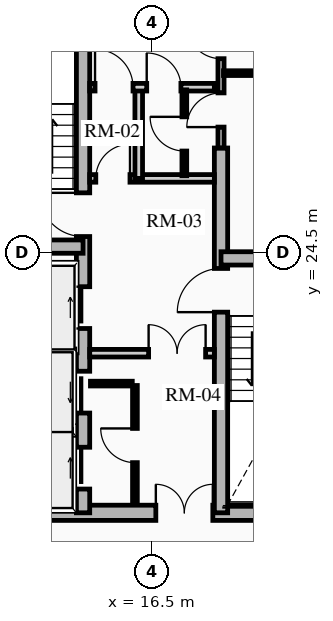
"""IFC4 building model, lengths in metres.
Left out: names, types, materials, properties, quantities, classifications, styles, units other than length and angle.
Written with IfcOpenShell. Run it as: python <this file> out.ifc"""

import sys

from ifc_helpers import new_model, si_unit, direction, frame, frame_2d, origin, place, context, subcontext, project, spatial, rectangle, extrude, source, transform, mapped, element, fill, save


model = new_model("IFC4")
c1 = context("Model", 3, precision=1e-05, world=origin(), true_north=direction((0.0, 1.0)))
c2 = subcontext(c1, "Body", "Model", "MODEL_VIEW")
j1 = project(units=[si_unit("LENGTHUNIT", "METRE"), si_unit("PLANEANGLEUNIT", "RADIAN")], contexts=[c1])
p1 = place(None, origin())
s1 = spatial("IfcSite", under=j1, at=p1, CompositionType="ELEMENT")
p2 = place(p1, origin())
s2 = spatial("IfcBuilding", under=s1, at=p2, CompositionType="ELEMENT")
p3 = place(p2, frame((0.0, 0.0, 205.39)))
s3 = spatial("IfcBuildingStorey", under=s2, at=p3, CompositionType="ELEMENT", Elevation=205.39)
p4 = place(p3, frame((11.15, 17.65, 0.0), z_axis=(0.0, 0.0, 1.0), x_axis=(1.0, 0.0, 0.0)))
e1 = element("IfcWall", 1, at=p4, inside=s3, PredefinedType="SHEAR", context=c2, shape_type="SweptSolid", body=[
    extrude(rectangle(XDim=10.7, YDim=0.4, at=frame_2d((5.35, 0.0))), origin(), (0.0, 0.0, 1.0), 2.91),
])
m1 = source(origin(), c2, "Body", "SweptSolid", [
    extrude(rectangle(XDim=1.5, YDim=2.02, at=frame_2d((0.75, 1.01))), frame((0.0, 0.21, 0.0), z_axis=(0.0, -1.0, 0.0), x_axis=(1.0, 0.0, 0.0)), (0.0, 0.0, 1.0), 0.42),
])
p5 = place(p4, frame((5.45, 0.0, 0.0)))
e2 = element("IfcOpeningElement", 2, at=p5, cuts=e1, PredefinedType="OPENING", context=c2, shape_type="MappedRepresentation", body=[
    mapped(m1, transform((0.0, 0.0, 0.0), x_axis=(1.0, 0.0, 0.0), y_axis=(0.0, 1.0, 0.0), z_axis=(0.0, 0.0, 1.0), scale=1.0)),
])
p6 = place(p3, frame((14.685, 17.65, 0.0), z_axis=(0.0, 0.0, 1.0), x_axis=(0.0, 1.0, 0.0)))
e3 = element("IfcWall", 3, at=p6, inside=s3, PredefinedType="SHEAR", context=c2, shape_type="SweptSolid", body=[
    extrude(rectangle(XDim=13.7, YDim=0.35, at=frame_2d((6.85, 0.0))), origin(), (0.0, 0.0, 1.0), 2.91),
])
m2 = source(origin(), c2, "Body", "SweptSolid", [
    extrude(rectangle(XDim=1.1, YDim=2.015, at=frame_2d((0.55, 1.007))), frame((0.0, 0.185, 0.0), z_axis=(0.0, -1.0, 0.0), x_axis=(1.0, 0.0, 0.0)), (0.0, 0.0, 1.0), 0.37),
])
p7 = place(p6, frame((4.85, 0.0, 0.0)))
e4 = element("IfcOpeningElement", 4, at=p7, cuts=e3, PredefinedType="OPENING", context=c2, shape_type="MappedRepresentation", body=[
    mapped(m2, transform((0.0, 0.0, 0.0), x_axis=(1.0, 0.0, 0.0), y_axis=(0.0, 1.0, 0.0), z_axis=(0.0, 0.0, 1.0), scale=1.0)),
])
p8 = place(p6, frame((0.625, 0.0, 0.0)))
e5 = element("IfcOpeningElement", 5, at=p8, cuts=e3, PredefinedType="OPENING", context=c2, shape_type="MappedRepresentation", body=[
    mapped(m2, transform((0.0, 0.0, 0.0), x_axis=(1.0, 0.0, 0.0), y_axis=(0.0, 1.0, 0.0), z_axis=(0.0, 0.0, 1.0), scale=1.0)),
])
p9 = place(p6, frame((2.625, 0.0, 0.0)))
e6 = element("IfcOpeningElement", 6, at=p9, cuts=e3, PredefinedType="OPENING", context=c2, shape_type="MappedRepresentation", body=[
    mapped(m2, transform((0.0, 0.0, 0.0), x_axis=(1.0, 0.0, 0.0), y_axis=(0.0, 1.0, 0.0), z_axis=(0.0, 0.0, 1.0), scale=1.0)),
])
m3 = source(origin(), c2, "Body", "SweptSolid", [
    extrude(rectangle(XDim=1.15, YDim=2.02, at=frame_2d((0.575, 1.01))), frame((0.0, 0.185, 0.0), z_axis=(0.0, -1.0, 0.0), x_axis=(1.0, 0.0, 0.0)), (0.0, 0.0, 1.0), 0.37),
])
p10 = place(p6, frame((7.27, 0.0, 0.0)))
e7 = element("IfcOpeningElement", 7, at=p10, cuts=e3, PredefinedType="OPENING", context=c2, shape_type="MappedRepresentation", body=[
    mapped(m3, transform((0.0, 0.0, 0.0), x_axis=(1.0, 0.0, 0.0), y_axis=(0.0, 1.0, 0.0), z_axis=(0.0, 0.0, 1.0), scale=1.0)),
])
p11 = place(p3, frame((18.315, 17.65, 0.0), z_axis=(0.0, 0.0, 1.0), x_axis=(0.0, 1.0, 0.0)))
e8 = element("IfcWall", 8, at=p11, inside=s3, PredefinedType="SHEAR", context=c2, shape_type="SweptSolid", body=[
    extrude(rectangle(XDim=9.6, YDim=0.35, at=frame_2d((4.8, 0.0))), origin(), (0.0, 0.0, 1.0), 2.91),
])
p12 = place(p11, frame((5.28, 0.0, 0.0)))
e9 = element("IfcOpeningElement", 9, at=p12, cuts=e8, PredefinedType="OPENING", context=c2, shape_type="MappedRepresentation", body=[
    mapped(m3, transform((0.0, 0.0, 0.0), x_axis=(1.0, 0.0, 0.0), y_axis=(0.0, 1.0, 0.0), z_axis=(0.0, 0.0, 1.0), scale=1.0)),
])
for number, where, z_axis, x_axis in (
    (10, (11.4, 24.655, 0.0), (0.0, 0.0, 1.0), (1.0, 0.0, 0.0)),
    (11, (18.315, 24.345, 0.0), (0.0, 0.0, 1.0), (1.0, 0.0, 0.0)),
):
    element("IfcWall", number, at=place(p3, frame(where, z_axis=z_axis, x_axis=x_axis)), inside=s3, PredefinedType="SHEAR", context=c2, shape_type="SweptSolid", body=[
        extrude(rectangle(XDim=3.285, YDim=0.35, at=frame_2d((1.643, 0.0))), origin(), (0.0, 0.0, 1.0), 2.91),
    ])
for number, where, z_axis, x_axis in (
    (12, (11.52, 21.8, 0.0), (0.0, 0.0, 1.0), (1.0, 0.0, 0.0)),
    (13, (11.52, 19.825, 0.0), (0.0, 0.0, 1.0), (1.0, 0.0, 0.0)),
):
    element("IfcWall", number, at=place(p3, frame(where, z_axis=z_axis, x_axis=x_axis)), inside=s3, PredefinedType="SHEAR", context=c2, shape_type="SweptSolid", body=[
        extrude(rectangle(XDim=2.97, YDim=0.2, at=frame_2d((1.485, 0.0))), origin(), (0.0, 0.0, 1.0), 2.91),
    ])
p13 = place(p3, frame((14.86, 21.85, 0.0), z_axis=(0.0, 0.0, 1.0), x_axis=(1.0, 0.0, 0.0)))
e14 = element("IfcWall", 14, at=p13, inside=s3, PredefinedType="PARTITIONING", context=c2, shape_type="SweptSolid", body=[
    extrude(rectangle(XDim=3.28, YDim=0.2, at=frame_2d((1.64, 0.0))), origin(), (0.0, 0.0, 1.0), 2.685),
])
m4 = source(origin(), c2, "Body", "SweptSolid", [
    extrude(rectangle(XDim=1.5, YDim=2.02, at=frame_2d((0.75, 1.01))), frame((0.0, 0.11, 0.0), z_axis=(0.0, -1.0, 0.0), x_axis=(1.0, 0.0, 0.0)), (0.0, 0.0, 1.0), 0.22),
])
p14 = place(p13, frame((1.55, 0.0, 0.0)))
e15 = element("IfcOpeningElement", 15, at=p14, cuts=e14, PredefinedType="OPENING", context=c2, shape_type="MappedRepresentation", body=[
    mapped(m4, transform((0.0, 0.0, 0.0), x_axis=(1.0, 0.0, 0.0), y_axis=(0.0, 1.0, 0.0), z_axis=(0.0, 0.0, 1.0), scale=1.0)),
])
p15 = place(p3, frame((14.86, 26.45, 0.0), z_axis=(0.0, 0.0, 1.0), x_axis=(1.0, 0.0, 0.0)))
e16 = element("IfcWall", 16, at=p15, inside=s3, PredefinedType="PARTITIONING", context=c2, shape_type="SweptSolid", body=[
    extrude(rectangle(XDim=3.28, YDim=0.2, at=frame_2d((1.64, 0.0))), origin(), (0.0, 0.0, 1.0), 2.685),
])
m5 = source(origin(), c2, "Body", "SweptSolid", [
    extrude(rectangle(XDim=0.9, YDim=2.005, at=frame_2d((0.45, 1.002))), frame((0.0, 0.11, 0.0), z_axis=(0.0, -1.0, 0.0), x_axis=(1.0, 0.0, 0.0)), (0.0, 0.0, 1.0), 0.22),
])
p16 = place(p15, frame((0.16, 0.0, 0.0)))
e17 = element("IfcOpeningElement", 17, at=p16, cuts=e16, PredefinedType="OPENING", context=c2, shape_type="MappedRepresentation", body=[
    mapped(m5, transform((0.0, 0.0, 0.0), x_axis=(1.0, 0.0, 0.0), y_axis=(0.0, 1.0, 0.0), z_axis=(0.0, 0.0, 1.0), scale=1.0)),
])
p17 = place(p3, frame((16.15, 26.45, 0.0), z_axis=(0.0, 0.0, 1.0), x_axis=(0.0, 1.0, 0.0)))
e18 = element("IfcWall", 18, at=p17, inside=s3, PredefinedType="PARTITIONING", context=c2, shape_type="SweptSolid", body=[
    extrude(rectangle(XDim=2.4, YDim=0.2, at=frame_2d((1.2, 0.0))), origin(), (0.0, 0.0, 1.0), 2.685),
])
p18 = place(p3, frame((14.86, 28.85, 0.0), z_axis=(0.0, 0.0, 1.0), x_axis=(1.0, 0.0, 0.0)))
e19 = element("IfcWall", 19, at=p18, inside=s3, PredefinedType="PARTITIONING", context=c2, shape_type="SweptSolid", body=[
    extrude(rectangle(XDim=3.28, YDim=0.2, at=frame_2d((1.64, 0.0))), origin(), (0.0, 0.0, 1.0), 2.685),
])
m6 = source(origin(), c2, "Body", "SweptSolid", [
    extrude(rectangle(XDim=1.0, YDim=2.015, at=frame_2d((0.5, 1.007))), frame((0.0, 0.11, 0.0), z_axis=(0.0, -1.0, 0.0), x_axis=(1.0, 0.0, 0.0)), (0.0, 0.0, 1.0), 0.22),
])
p19 = place(p18, frame((0.14, 0.0, 0.0)))
e20 = element("IfcOpeningElement", 20, at=p19, cuts=e19, PredefinedType="OPENING", context=c2, shape_type="MappedRepresentation", body=[
    mapped(m6, transform((0.0, 0.0, 0.0), x_axis=(1.0, 0.0, 0.0), y_axis=(0.0, 1.0, 0.0), z_axis=(0.0, 0.0, 1.0), scale=1.0)),
])
p20 = place(p18, frame((1.5, 0.0, 0.0)))
e21 = element("IfcOpeningElement", 21, at=p20, cuts=e19, PredefinedType="OPENING", context=c2, shape_type="MappedRepresentation", body=[
    mapped(m5, transform((0.0, 0.0, 0.0), x_axis=(1.0, 0.0, 0.0), y_axis=(0.0, 1.0, 0.0), z_axis=(0.0, 0.0, 1.0), scale=1.0)),
])
p21 = place(p3, frame((16.05, 17.92, 0.0), z_axis=(0.0, 0.0, 1.0), x_axis=(0.0, 1.0, 0.0)))
e22 = element("IfcWall", 22, at=p21, inside=s3, PredefinedType="PARTITIONING", context=c2, shape_type="SweptSolid", body=[
    extrude(rectangle(XDim=3.08, YDim=0.125, at=frame_2d((1.54, 0.0))), origin(), (0.0, 0.0, 1.0), 2.685),
])
m7 = source(origin(), c2, "Body", "SweptSolid", [
    extrude(rectangle(XDim=0.9, YDim=2.005, at=frame_2d((0.45, 1.002))), frame((0.0, 0.073, 0.0), z_axis=(0.0, -1.0, 0.0), x_axis=(1.0, 0.0, 0.0)), (0.0, 0.0, 1.0), 0.145),
])
p22 = place(p21, frame((1.05, 0.0, 0.0)))
e23 = element("IfcOpeningElement", 23, at=p22, cuts=e22, PredefinedType="OPENING", context=c2, shape_type="MappedRepresentation", body=[
    mapped(m7, transform((0.0, 0.0, 0.0), x_axis=(1.0, 0.0, 0.0), y_axis=(0.0, 1.0, 0.0), z_axis=(0.0, 0.0, 1.0), scale=1.0)),
])
p23 = place(p3, frame((14.88, 21.05, 0.0), z_axis=(0.0, 0.0, 1.0), x_axis=(1.0, 0.0, 0.0)))
e24 = element("IfcWall", 24, at=p23, inside=s3, PredefinedType="PARTITIONING", context=c2, shape_type="SweptSolid", body=[
    extrude(rectangle(XDim=1.1, YDim=0.125, at=frame_2d((0.55, 0.0))), origin(), (0.0, 0.0, 1.0), 2.685),
])
p24 = place(p3, frame((17.35, 26.52, 0.0), z_axis=(0.0, 0.0, 1.0), x_axis=(0.0, 1.0, 0.0)))
e25 = element("IfcWall", 25, at=p24, inside=s3, PredefinedType="PARTITIONING", context=c2, shape_type="SweptSolid", body=[
    extrude(rectangle(XDim=2.26, YDim=0.125, at=frame_2d((1.13, 0.0))), origin(), (0.0, 0.0, 1.0), 2.685),
])
p25 = place(p24, frame((0.65, 0.0, 0.0)))
e26 = element("IfcOpeningElement", 26, at=p25, cuts=e25, PredefinedType="OPENING", context=c2, shape_type="MappedRepresentation", body=[
    mapped(m7, transform((0.0, 0.0, 0.0), x_axis=(1.0, 0.0, 0.0), y_axis=(0.0, 1.0, 0.0), z_axis=(0.0, 0.0, 1.0), scale=1.0)),
])
p26 = place(p3, frame((18.315, 27.25, 0.0), z_axis=(0.0, 0.0, 1.0), x_axis=(0.0, 1.0, 0.0)))
e27 = element("IfcWall", 27, at=p26, inside=s3, PredefinedType="PARTITIONING", context=c2, shape_type="SweptSolid", body=[
    extrude(rectangle(XDim=3.9, YDim=0.16, at=frame_2d((1.95, 0.0))), origin(), (0.0, 0.0, 1.0), 2.685),
])
m8 = source(origin(), c2, "Body", "SweptSolid", [
    extrude(rectangle(XDim=0.9, YDim=2.005, at=frame_2d((0.45, 1.002))), frame((0.0, 0.09, 0.0), z_axis=(0.0, -1.0, 0.0), x_axis=(1.0, 0.0, 0.0)), (0.0, 0.0, 1.0), 0.18),
])
p27 = place(p26, frame((0.55, 0.0, 0.0)))
e28 = element("IfcOpeningElement", 28, at=p27, cuts=e27, PredefinedType="OPENING", context=c2, shape_type="MappedRepresentation", body=[
    mapped(m8, transform((0.0, 0.0, 0.0), x_axis=(1.0, 0.0, 0.0), y_axis=(0.0, 1.0, 0.0), z_axis=(0.0, 0.0, 1.0), scale=1.0)),
])
p28 = place(p26, frame((2.35, 0.0, 0.0)))
e29 = element("IfcOpeningElement", 29, at=p28, cuts=e27, PredefinedType="OPENING", context=c2, shape_type="MappedRepresentation", body=[
    mapped(m8, transform((0.0, 0.0, 0.0), x_axis=(1.0, 0.0, 0.0), y_axis=(0.0, 1.0, 0.0), z_axis=(0.0, 0.0, 1.0), scale=1.0)),
])
p29 = place(p3, frame((18.38, 29.22, 0.0), z_axis=(0.0, 0.0, 1.0), x_axis=(1.0, 0.0, 0.0)))
e30 = element("IfcWall", 30, at=p29, inside=s3, PredefinedType="PARTITIONING", context=c2, shape_type="SweptSolid", body=[
    extrude(rectangle(XDim=3.22, YDim=0.125, at=frame_2d((1.61, 0.0))), origin(), (0.0, 0.0, 1.0), 2.222),
])
m9 = source(origin(), c2, "Body", "SweptSolid", [
    extrude(rectangle(XDim=1.1, YDim=2.015, at=frame_2d((0.55, 1.007))), frame((0.0, 0.025, 0.0), z_axis=(0.0, -1.0, 0.0), x_axis=(1.0, 0.0, 0.0)), (0.0, 0.0, 1.0), 0.05),
])
p30 = place(p7, origin())
e31 = element("IfcDoor", 31, at=p30, inside=s3, OperationType="SLIDING_TO_RIGHT", PredefinedType="DOOR", context=c2, shape_type="MappedRepresentation", body=[
    mapped(m9, transform((0.0, 0.0, 0.0), x_axis=(1.0, 0.0, 0.0), y_axis=(0.0, 1.0, 0.0), z_axis=(0.0, 0.0, 1.0), scale=1.0)),
])
fill(e4, e31)
p31 = place(p8, origin())
e32 = element("IfcDoor", 32, at=p31, inside=s3, OperationType="SLIDING_TO_RIGHT", PredefinedType="DOOR", context=c2, shape_type="MappedRepresentation", body=[
    mapped(m9, transform((0.0, 0.0, 0.0), x_axis=(1.0, 0.0, 0.0), y_axis=(0.0, 1.0, 0.0), z_axis=(0.0, 0.0, 1.0), scale=1.0)),
])
fill(e5, e32)
p32 = place(p9, origin())
e33 = element("IfcDoor", 33, at=p32, inside=s3, OperationType="SLIDING_TO_LEFT", PredefinedType="DOOR", context=c2, shape_type="MappedRepresentation", body=[
    mapped(m9, transform((0.0, 0.0, 0.0), x_axis=(1.0, 0.0, 0.0), y_axis=(0.0, 1.0, 0.0), z_axis=(0.0, 0.0, 1.0), scale=1.0)),
])
fill(e6, e33)
m10 = source(origin(), c2, "Body", "SweptSolid", [
    extrude(rectangle(XDim=1.15, YDim=2.02, at=frame_2d((0.575, 1.01))), frame((0.0, 0.025, 0.0), z_axis=(0.0, -1.0, 0.0), x_axis=(1.0, 0.0, 0.0)), (0.0, 0.0, 1.0), 0.05),
])
p33 = place(p10, origin())
e34 = element("IfcDoor", 34, at=p33, inside=s3, OperationType="SINGLE_SWING_RIGHT", PredefinedType="DOOR", context=c2, shape_type="MappedRepresentation", body=[
    mapped(m10, transform((0.0, 0.0, 0.0), x_axis=(1.0, 0.0, 0.0), y_axis=(0.0, 1.0, 0.0), z_axis=(0.0, 0.0, 1.0), scale=1.0)),
])
fill(e7, e34)
p34 = place(p12, origin())
e35 = element("IfcDoor", 35, at=p34, inside=s3, OperationType="SINGLE_SWING_LEFT", PredefinedType="DOOR", context=c2, shape_type="MappedRepresentation", body=[
    mapped(m10, transform((0.0, 0.0, 0.0), x_axis=(1.0, 0.0, 0.0), y_axis=(0.0, 1.0, 0.0), z_axis=(0.0, 0.0, 1.0), scale=1.0)),
])
fill(e9, e35)
m11 = source(origin(), c2, "Body", "SweptSolid", [
    extrude(rectangle(XDim=1.5, YDim=2.02, at=frame_2d((0.75, 1.01))), frame((0.0, 0.025, 0.0), z_axis=(0.0, -1.0, 0.0), x_axis=(1.0, 0.0, 0.0)), (0.0, 0.0, 1.0), 0.05),
])
p35 = place(p5, origin())
e36 = element("IfcDoor", 36, at=p35, inside=s3, OperationType="DOUBLE_DOOR_SINGLE_SWING", PredefinedType="DOOR", context=c2, shape_type="MappedRepresentation", body=[
    mapped(m11, transform((0.0, 0.0, 0.0), x_axis=(1.0, 0.0, 0.0), y_axis=(0.0, 1.0, 0.0), z_axis=(0.0, 0.0, 1.0), scale=1.0)),
])
fill(e2, e36)
p36 = place(p14, origin())
e37 = element("IfcDoor", 37, at=p36, inside=s3, OperationType="DOUBLE_DOOR_SINGLE_SWING", PredefinedType="DOOR", context=c2, shape_type="MappedRepresentation", body=[
    mapped(m11, transform((0.0, 0.0, 0.0), x_axis=(1.0, 0.0, 0.0), y_axis=(0.0, 1.0, 0.0), z_axis=(0.0, 0.0, 1.0), scale=1.0)),
])
fill(e15, e37)
m12 = source(origin(), c2, "Body", "SweptSolid", [
    extrude(rectangle(XDim=0.9, YDim=2.005, at=frame_2d((0.45, 1.002))), frame((0.0, 0.025, 0.0), z_axis=(0.0, -1.0, 0.0), x_axis=(1.0, 0.0, 0.0)), (0.0, 0.0, 1.0), 0.05),
])
p37 = place(p16, origin())
e38 = element("IfcDoor", 38, at=p37, inside=s3, OperationType="SINGLE_SWING_RIGHT", PredefinedType="DOOR", context=c2, shape_type="MappedRepresentation", body=[
    mapped(m12, transform((0.0, 0.0, 0.0), x_axis=(1.0, 0.0, 0.0), y_axis=(0.0, 1.0, 0.0), z_axis=(0.0, 0.0, 1.0), scale=1.0)),
])
fill(e17, e38)
m13 = source(origin(), c2, "Body", "SweptSolid", [
    extrude(rectangle(XDim=1.0, YDim=2.015, at=frame_2d((0.5, 1.007))), frame((0.0, 0.025, 0.0), z_axis=(0.0, -1.0, 0.0), x_axis=(1.0, 0.0, 0.0)), (0.0, 0.0, 1.0), 0.05),
])
p38 = place(p19, origin())
e39 = element("IfcDoor", 39, at=p38, inside=s3, OperationType="SINGLE_SWING_LEFT", PredefinedType="DOOR", context=c2, shape_type="MappedRepresentation", body=[
    mapped(m13, transform((0.0, 0.0, 0.0), x_axis=(1.0, 0.0, 0.0), y_axis=(0.0, 1.0, 0.0), z_axis=(0.0, 0.0, 1.0), scale=1.0)),
])
fill(e20, e39)
p39 = place(p22, origin())
e40 = element("IfcDoor", 40, at=p39, inside=s3, OperationType="SINGLE_SWING_RIGHT", PredefinedType="DOOR", context=c2, shape_type="MappedRepresentation", body=[
    mapped(m12, transform((0.0, 0.0, 0.0), x_axis=(1.0, 0.0, 0.0), y_axis=(0.0, 1.0, 0.0), z_axis=(0.0, 0.0, 1.0), scale=1.0)),
])
fill(e23, e40)
p40 = place(p20, origin())
e41 = element("IfcDoor", 41, at=p40, inside=s3, OperationType="SINGLE_SWING_LEFT", PredefinedType="DOOR", context=c2, shape_type="MappedRepresentation", body=[
    mapped(m12, transform((0.0, 0.0, 0.0), x_axis=(1.0, 0.0, 0.0), y_axis=(0.0, 1.0, 0.0), z_axis=(0.0, 0.0, 1.0), scale=1.0)),
])
fill(e21, e41)
p41 = place(p25, origin())
e42 = element("IfcDoor", 42, at=p41, inside=s3, OperationType="SINGLE_SWING_RIGHT", PredefinedType="DOOR", context=c2, shape_type="MappedRepresentation", body=[
    mapped(m12, transform((0.0, 0.0, 0.0), x_axis=(1.0, 0.0, 0.0), y_axis=(0.0, 1.0, 0.0), z_axis=(0.0, 0.0, 1.0), scale=1.0)),
])
fill(e26, e42)
p42 = place(p27, origin())
e43 = element("IfcDoor", 43, at=p42, inside=s3, OperationType="SINGLE_SWING_LEFT", PredefinedType="DOOR", context=c2, shape_type="MappedRepresentation", body=[
    mapped(m12, transform((0.0, 0.0, 0.0), x_axis=(1.0, 0.0, 0.0), y_axis=(0.0, 1.0, 0.0), z_axis=(0.0, 0.0, 1.0), scale=1.0)),
])
fill(e28, e43)
p43 = place(p28, origin())
e44 = element("IfcDoor", 44, at=p43, inside=s3, OperationType="SINGLE_SWING_RIGHT", PredefinedType="DOOR", context=c2, shape_type="MappedRepresentation", body=[
    mapped(m12, transform((0.0, 0.0, 0.0), x_axis=(1.0, 0.0, 0.0), y_axis=(0.0, 1.0, 0.0), z_axis=(0.0, 0.0, 1.0), scale=1.0)),
])
fill(e29, e44)
save(model, sys.argv[1])
